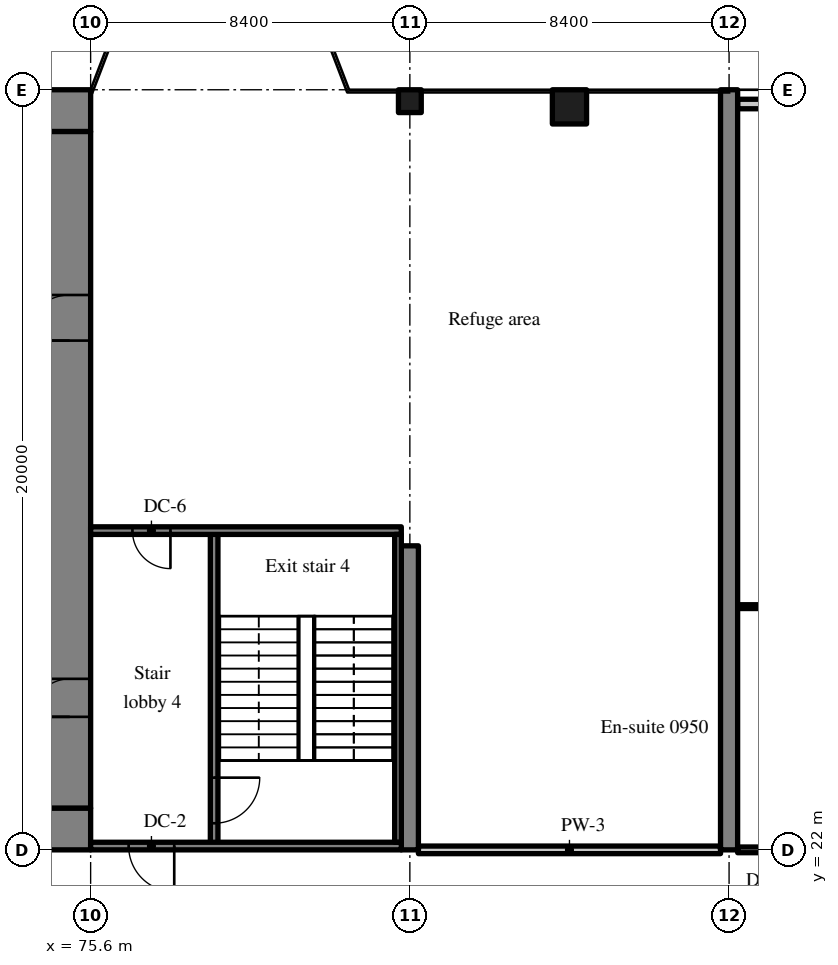
"""IFC4 building model, lengths in metres.
Left out: names, types, materials, properties, quantities, classifications, styles, units other than length and angle.
Written with IfcOpenShell. Run it as: python <this file> out.ifc"""

import sys

from ifc_helpers import new_model, si_unit, direction, frame, frame_2d, origin, origin_2d, place, context, subcontext, project, spatial, rectangle, extrude, source, transform, mapped, element, fill, save


model = new_model("IFC4")
c1 = context("Model", 3, precision=1e-05, world=origin(), true_north=direction((0.0, 1.0)))
c2 = subcontext(c1, "Body", "Model", "MODEL_VIEW")
j1 = project(units=[si_unit("LENGTHUNIT", "METRE"), si_unit("PLANEANGLEUNIT", "RADIAN")], contexts=[c1])
p1 = place(None, origin())
s1 = spatial("IfcSite", under=j1, at=p1, CompositionType="ELEMENT")
p2 = place(p1, origin())
s2 = spatial("IfcBuilding", under=s1, at=p2, CompositionType="ELEMENT")
p3 = place(p2, frame((0.0, 0.0, 43.0)))
s3 = spatial("IfcBuildingStorey", under=s2, at=p3, CompositionType="ELEMENT", Elevation=43.0)
m1 = source(origin(), c2, "Body", "SweptSolid", [
    extrude(rectangle(XDim=50.4, YDim=1.1, at=frame_2d((25.2, 0.0))), origin(), (0.0, 0.0, 1.0), 3.52),
])
p4 = place(p3, frame((25.2, 22.55, 0.0), z_axis=(0.0, 0.0, 1.0), x_axis=(1.0, 0.0, 0.0)))
e1 = element("IfcWall", 1, at=p4, inside=s3, PredefinedType="SHEAR", context=c2, shape_type="MappedRepresentation", body=[
    mapped(m1, transform((0.0, 0.0, 0.0), scale=1.0)),
])
m2 = source(origin(), c2, "Body", "SweptSolid", [
    extrude(rectangle(XDim=1.8, YDim=2.1, at=frame_2d((0.9, 1.05))), frame((0.0, 0.56, 0.0), z_axis=(0.0, -1.0, 0.0), x_axis=(1.0, 0.0, 0.0)), (0.0, 0.0, 1.0), 1.12),
])
p5 = place(p4, frame((15.9, 0.0, 0.0)))
e2 = element("IfcOpeningElement", 2, at=p5, cuts=e1, PredefinedType="OPENING", context=c2, shape_type="MappedRepresentation", body=[
    mapped(m2, transform((0.0, 0.0, 0.0), scale=1.0)),
])
m3 = source(origin(), c2, "Body", "SweptSolid", [
    extrude(rectangle(XDim=1.2, YDim=2.1, at=frame_2d((0.6, 1.05))), frame((0.0, 0.56, 0.0), z_axis=(0.0, -1.0, 0.0), x_axis=(1.0, 0.0, 0.0)), (0.0, 0.0, 1.0), 1.12),
])
p6 = place(p4, frame((27.0, 0.0, 0.0)))
e3 = element("IfcOpeningElement", 3, at=p6, cuts=e1, PredefinedType="OPENING", context=c2, shape_type="MappedRepresentation", body=[
    mapped(m3, transform((0.0, 0.0, 0.0), scale=1.0)),
])
m4 = source(origin(), c2, "Body", "SweptSolid", [
    extrude(rectangle(XDim=0.9, YDim=2.1, at=frame_2d((0.45, 1.05))), frame((0.0, 0.56, 0.0), z_axis=(0.0, -1.0, 0.0), x_axis=(1.0, 0.0, 0.0)), (0.0, 0.0, 1.0), 1.12),
])
p7 = place(p4, frame((33.75, 0.0, 0.0)))
e4 = element("IfcOpeningElement", 4, at=p7, cuts=e1, PredefinedType="OPENING", context=c2, shape_type="MappedRepresentation", body=[
    mapped(m4, transform((0.0, 0.0, 0.0), scale=1.0)),
])
p8 = place(p4, frame((30.75, 0.0, 0.0)))
e5 = element("IfcOpeningElement", 5, at=p8, cuts=e1, PredefinedType="OPENING", context=c2, shape_type="MappedRepresentation", body=[
    mapped(m4, transform((0.0, 0.0, 0.0), scale=1.0)),
])
p9 = place(p4, frame((39.75, 0.0, 0.0)))
e6 = element("IfcOpeningElement", 6, at=p9, cuts=e1, PredefinedType="OPENING", context=c2, shape_type="MappedRepresentation", body=[
    mapped(m4, transform((0.0, 0.0, 0.0), scale=1.0)),
])
p10 = place(p4, frame((36.75, 0.0, 0.0)))
e7 = element("IfcOpeningElement", 7, at=p10, cuts=e1, PredefinedType="OPENING", context=c2, shape_type="MappedRepresentation", body=[
    mapped(m4, transform((0.0, 0.0, 0.0), scale=1.0)),
])
p11 = place(p4, frame((6.425, 0.0, 0.0)))
e8 = element("IfcOpeningElement", 8, at=p11, cuts=e1, PredefinedType="OPENING", context=c2, shape_type="MappedRepresentation", body=[
    mapped(m3, transform((0.0, 0.0, 0.0), scale=1.0)),
])
p12 = place(p4, frame((47.675, 0.0, 0.0)))
e9 = element("IfcOpeningElement", 9, at=p12, cuts=e1, PredefinedType="OPENING", context=c2, shape_type="MappedRepresentation", body=[
    mapped(m3, transform((0.0, 0.0, 0.0), scale=1.0)),
])
p13 = place(p3, frame((25.2, 41.45, 0.0), z_axis=(0.0, 0.0, 1.0), x_axis=(1.0, 0.0, 0.0)))
e10 = element("IfcWall", 10, at=p13, inside=s3, PredefinedType="SHEAR", context=c2, shape_type="MappedRepresentation", body=[
    mapped(m1, transform((0.0, 0.0, 0.0), scale=1.0)),
])
m5 = source(origin(), c2, "Body", "SweptSolid", [
    extrude(rectangle(XDim=17.8, YDim=1.1, at=frame_2d((8.9, 0.0))), origin(), (0.0, 0.0, 1.0), 3.52),
])
p14 = place(p3, frame((75.05, 23.1, 0.0), z_axis=(0.0, 0.0, 1.0), x_axis=(0.0, 1.0, 0.0)))
e11 = element("IfcWall", 11, at=p14, inside=s3, PredefinedType="SHEAR", context=c2, shape_type="MappedRepresentation", body=[
    mapped(m5, transform((0.0, 0.0, 0.0), scale=1.0)),
])
m6 = source(origin(), c2, "Body", "SweptSolid", [
    extrude(rectangle(XDim=1.0, YDim=2.1, at=frame_2d((0.5, 1.05))), frame((0.0, 0.56, 0.0), z_axis=(0.0, -1.0, 0.0), x_axis=(1.0, 0.0, 0.0)), (0.0, 0.0, 1.0), 1.12),
])
p15 = place(p14, frame((2.4, 0.0, 0.0)))
e12 = element("IfcOpeningElement", 12, at=p15, cuts=e11, PredefinedType="OPENING", context=c2, shape_type="MappedRepresentation", body=[
    mapped(m6, transform((0.0, 0.0, 0.0), scale=1.0)),
])
p16 = place(p14, frame((12.3, 0.0, 0.0)))
e13 = element("IfcOpeningElement", 13, at=p16, cuts=e11, PredefinedType="OPENING", context=c2, shape_type="MappedRepresentation", body=[
    mapped(m3, transform((0.0, 0.0, 0.0), scale=1.0)),
])
m7 = source(origin(), c2, "Body", "SweptSolid", [
    extrude(rectangle(XDim=8.0, YDim=0.45, at=frame_2d((4.0, 0.0))), origin(), (0.0, 0.0, 1.0), 3.52),
])
p17 = place(p3, frame((84.0, 22.0, 0.0), z_axis=(0.0, 0.0, 1.0), x_axis=(0.0, 1.0, 0.0)))
e14 = element("IfcWall", 14, at=p17, inside=s3, PredefinedType="SHEAR", context=c2, shape_type="MappedRepresentation", body=[
    mapped(m7, transform((0.0, 0.0, 0.0), scale=1.0)),
])
m8 = source(origin(), c2, "Body", "SweptSolid", [
    extrude(rectangle(XDim=20.0, YDim=0.45, at=frame_2d((10.0, 0.0))), origin(), (0.0, 0.0, 1.0), 3.52),
])
p18 = place(p3, frame((92.4, 22.0, 0.0), z_axis=(0.0, 0.0, 1.0), x_axis=(0.0, 1.0, 0.0)))
e15 = element("IfcWall", 15, at=p18, inside=s3, PredefinedType="SHEAR", context=c2, shape_type="MappedRepresentation", body=[
    mapped(m8, transform((0.0, 0.0, 0.0), scale=1.0)),
])
m9 = source(origin(), c2, "Body", "SweptSolid", [
    extrude(rectangle(XDim=0.6, YDim=0.6, at=origin_2d()), origin(), (0.0, 0.0, 1.0), 3.52),
])
p19 = place(p3, frame((84.0, 41.7, 0.0), z_axis=(0.0, 0.0, 1.0), x_axis=(1.0, 0.0, 0.0)))
e16 = element("IfcColumn", 16, at=p19, inside=s3, PredefinedType="COLUMN", context=c2, shape_type="MappedRepresentation", body=[
    mapped(m9, transform((0.0, 0.0, 0.0), scale=1.0)),
])
m10 = source(origin(), c2, "Body", "SweptSolid", [
    extrude(rectangle(XDim=0.9, YDim=0.9, at=origin_2d()), origin(), (0.0, 0.0, 1.0), 3.52),
])
p20 = place(p3, frame((88.2, 41.55, 0.0), z_axis=(0.0, 0.0, 1.0), x_axis=(1.0, 0.0, 0.0)))
e17 = element("IfcColumn", 17, at=p20, inside=s3, PredefinedType="COLUMN", context=c2, shape_type="MappedRepresentation", body=[
    mapped(m10, transform((0.0, 0.0, 0.0), scale=1.0)),
])
m11 = source(origin(), c2, "Body", "SweptSolid", [
    extrude(rectangle(XDim=4.02, YDim=0.25, at=frame_2d((2.01, 0.0))), origin(), (0.0, 0.0, 1.0), 2.82),
])
p21 = place(p3, frame((96.645, 41.625, 0.0), z_axis=(0.0, 0.0, 1.0), x_axis=(-1.0, 0.0, 0.0)))
e18 = element("IfcWall", 18, at=p21, inside=s3, PredefinedType="SOLIDWALL", context=c2, shape_type="MappedRepresentation", body=[
    mapped(m11, transform((0.0, 0.0, 0.0), scale=1.0)),
])
m12 = source(origin(), c2, "Body", "SweptSolid", [
    extrude(rectangle(XDim=1.5, YDim=1.5, at=frame_2d((0.75, 0.75))), frame((0.0, 0.135, 0.0), z_axis=(0.0, -1.0, 0.0), x_axis=(1.0, 0.0, 0.0)), (0.0, 0.0, 1.0), 0.27),
])
p22 = place(p21, frame((1.26, 0.0, 0.9)))
e19 = element("IfcOpeningElement", 19, at=p22, cuts=e18, PredefinedType="OPENING", context=c2, shape_type="MappedRepresentation", body=[
    mapped(m12, transform((0.0, 0.0, 0.0), scale=1.0)),
])
m13 = source(origin(), c2, "Body", "SweptSolid", [
    extrude(rectangle(XDim=8.3, YDim=0.2, at=frame_2d((4.15, 0.0))), origin(), (0.0, 0.0, 1.0), 3.52),
])
p23 = place(p3, frame((78.85, 22.1, 0.0), z_axis=(0.0, 0.0, 1.0), x_axis=(0.0, 1.0, 0.0)))
e20 = element("IfcWall", 20, at=p23, inside=s3, PredefinedType="SOLIDWALL", context=c2, shape_type="MappedRepresentation", body=[
    mapped(m13, transform((0.0, 0.0, 0.0), scale=1.0)),
])
m14 = source(origin(), c2, "Body", "SweptSolid", [
    extrude(rectangle(XDim=1.2, YDim=2.1, at=frame_2d((0.6, 1.05))), frame((0.0, 0.11, 0.0), z_axis=(0.0, -1.0, 0.0), x_axis=(1.0, 0.0, 0.0)), (0.0, 0.0, 1.0), 0.22),
])
p24 = place(p23, frame((0.6, 0.0, 0.0)))
e21 = element("IfcOpeningElement", 21, at=p24, cuts=e20, PredefinedType="OPENING", context=c2, shape_type="MappedRepresentation", body=[
    mapped(m14, transform((0.0, 0.0, 0.0), scale=1.0)),
])
m15 = source(origin(), c2, "Body", "SweptSolid", [
    extrude(rectangle(XDim=8.175, YDim=0.2, at=frame_2d((4.087, 0.0))), origin(), (0.0, 0.0, 1.0), 3.52),
])
p25 = place(p3, frame((83.775, 22.1, 0.0), z_axis=(0.0, 0.0, 1.0), x_axis=(-1.0, 0.0, 0.0)))
e22 = element("IfcWall", 22, at=p25, inside=s3, PredefinedType="SOLIDWALL", context=c2, shape_type="MappedRepresentation", body=[
    mapped(m15, transform((0.0, 0.0, 0.0), scale=1.0)),
])
p26 = place(p25, frame((5.975, 0.0, 0.0)))
e23 = element("IfcOpeningElement", 23, at=p26, cuts=e22, PredefinedType="OPENING", context=c2, shape_type="MappedRepresentation", body=[
    mapped(m14, transform((0.0, 0.0, 0.0), scale=1.0)),
])
p27 = place(p3, frame((83.775, 30.4, 0.0), z_axis=(0.0, 0.0, 1.0), x_axis=(-1.0, 0.0, 0.0)))
e24 = element("IfcWall", 24, at=p27, inside=s3, PredefinedType="SOLIDWALL", context=c2, shape_type="MappedRepresentation", body=[
    mapped(m15, transform((0.0, 0.0, 0.0), scale=1.0)),
])
m16 = source(origin(), c2, "Body", "SweptSolid", [
    extrude(rectangle(XDim=1.0, YDim=2.1, at=frame_2d((0.5, 1.05))), frame((0.0, 0.11, 0.0), z_axis=(0.0, -1.0, 0.0), x_axis=(1.0, 0.0, 0.0)), (0.0, 0.0, 1.0), 0.22),
])
p28 = place(p27, frame((6.075, 0.0, 0.0)))
e25 = element("IfcOpeningElement", 25, at=p28, cuts=e24, PredefinedType="OPENING", context=c2, shape_type="MappedRepresentation", body=[
    mapped(m16, transform((0.0, 0.0, 0.0), scale=1.0)),
])
m17 = source(origin(), c2, "Body", "SweptSolid", [
    extrude(rectangle(XDim=8.1, YDim=0.175, at=frame_2d((4.05, 0.0))), origin(), (0.0, 0.0, 1.0), 3.52),
])
p29 = place(p3, frame((83.688, 22.2, 0.0), z_axis=(0.0, 0.0, 1.0), x_axis=(0.0, 1.0, 0.0)))
e26 = element("IfcWall", 26, at=p29, inside=s3, PredefinedType="SOLIDWALL", context=c2, shape_type="MappedRepresentation", body=[
    mapped(m17, transform((0.0, 0.0, 0.0), scale=1.0)),
])
m18 = source(origin(), c2, "Body", "SweptSolid", [
    extrude(rectangle(XDim=2.05, YDim=0.1, at=frame_2d((1.025, 0.0))), origin(), (0.0, 0.0, 1.0), 3.52),
])
p30 = place(p3, frame((92.625, 28.4, 0.0), z_axis=(0.0, 0.0, 1.0), x_axis=(1.0, 0.0, 0.0)))
e27 = element("IfcWall", 27, at=p30, inside=s3, PredefinedType="PARTITIONING", context=c2, shape_type="MappedRepresentation", body=[
    mapped(m18, transform((0.0, 0.0, 0.0), scale=1.0)),
])
m19 = source(origin(), c2, "Body", "SweptSolid", [
    extrude(rectangle(XDim=0.9, YDim=2.1, at=frame_2d((0.45, 1.05))), frame((0.0, 0.06, 0.0), z_axis=(0.0, -1.0, 0.0), x_axis=(1.0, 0.0, 0.0)), (0.0, 0.0, 1.0), 0.12),
])
p31 = place(p30, frame((0.575, 0.0, 0.0)))
e28 = element("IfcOpeningElement", 28, at=p31, cuts=e27, PredefinedType="OPENING", context=c2, shape_type="MappedRepresentation", body=[
    mapped(m19, transform((0.0, 0.0, 0.0), scale=1.0)),
])
m20 = source(origin(), c2, "Body", "SweptSolid", [
    extrude(rectangle(XDim=3.9, YDim=0.15, at=frame_2d((1.95, 0.0))), origin(), (0.0, 0.0, 1.0), 2.82),
])
p32 = place(p3, frame((92.625, 22.0, 0.0), z_axis=(0.0, 0.0, 1.0), x_axis=(1.0, 0.0, 0.0)))
e29 = element("IfcWall", 29, at=p32, inside=s3, PredefinedType="PARTITIONING", context=c2, shape_type="MappedRepresentation", body=[
    mapped(m20, transform((0.0, 0.0, 0.0), scale=1.0)),
])
m21 = source(origin(), c2, "Body", "SweptSolid", [
    extrude(rectangle(XDim=1.0, YDim=2.1, at=frame_2d((0.5, 1.05))), frame((0.0, 0.085, 0.0), z_axis=(0.0, -1.0, 0.0), x_axis=(1.0, 0.0, 0.0)), (0.0, 0.0, 1.0), 0.17),
])
p33 = place(p32, frame((2.5, 0.0, 0.0)))
e30 = element("IfcOpeningElement", 30, at=p33, cuts=e29, PredefinedType="OPENING", context=c2, shape_type="MappedRepresentation", body=[
    mapped(m21, transform((0.0, 0.0, 0.0), scale=1.0)),
])
m22 = source(origin(), c2, "Body", "SweptSolid", [
    extrude(rectangle(XDim=7.95, YDim=0.2, at=frame_2d((3.975, 0.0))), origin(), (0.0, 0.0, 1.0), 2.82),
])
p34 = place(p3, frame((84.225, 22.0, 0.0), z_axis=(0.0, 0.0, 1.0), x_axis=(1.0, 0.0, 0.0)))
e31 = element("IfcWall", 31, at=p34, inside=s3, PredefinedType="PARTITIONING", context=c2, shape_type="MappedRepresentation", body=[
    mapped(m22, transform((0.0, 0.0, 0.0), scale=1.0)),
])
m23 = source(origin(), c2, "Body", "SweptSolid", [
    extrude(rectangle(XDim=1.0, YDim=2.1, at=frame_2d((0.5, 1.05))), frame((0.0, 0.025, 0.0), z_axis=(0.0, -1.0, 0.0), x_axis=(1.0, 0.0, 0.0)), (0.0, 0.0, 1.0), 0.05),
])
p35 = place(p15, origin())
e32 = element("IfcDoor", 32, at=p35, inside=s3, OperationType="SINGLE_SWING_LEFT", PredefinedType="DOOR", context=c2, shape_type="MappedRepresentation", body=[
    mapped(m23, transform((0.0, 0.0, 0.0), scale=1.0)),
])
fill(e12, e32)
m24 = source(origin(), c2, "Body", "SweptSolid", [
    extrude(rectangle(XDim=1.2, YDim=2.1, at=frame_2d((0.6, 1.05))), frame((0.0, 0.025, 0.0), z_axis=(0.0, -1.0, 0.0), x_axis=(1.0, 0.0, 0.0)), (0.0, 0.0, 1.0), 0.05),
])
p36 = place(p16, origin())
e33 = element("IfcDoor", 33, at=p36, inside=s3, OperationType="SINGLE_SWING_LEFT", PredefinedType="DOOR", context=c2, shape_type="MappedRepresentation", body=[
    mapped(m24, transform((0.0, 0.0, 0.0), scale=1.0)),
])
fill(e13, e33)
p37 = place(p24, origin())
e34 = element("IfcDoor", 34, at=p37, inside=s3, OperationType="SINGLE_SWING_RIGHT", PredefinedType="DOOR", context=c2, shape_type="MappedRepresentation", body=[
    mapped(m24, transform((0.0, 0.0, 0.0), scale=1.0)),
])
fill(e21, e34)
p38 = place(p26, origin())
e35 = element("IfcDoor", 35, at=p38, inside=s3, OperationType="SINGLE_SWING_LEFT", PredefinedType="DOOR", context=c2, shape_type="MappedRepresentation", body=[
    mapped(m24, transform((0.0, 0.0, 0.0), scale=1.0)),
])
fill(e23, e35)
p39 = place(p28, origin())
e36 = element("IfcDoor", 36, at=p39, inside=s3, OperationType="SINGLE_SWING_LEFT", PredefinedType="DOOR", context=c2, shape_type="MappedRepresentation", body=[
    mapped(m23, transform((0.0, 0.0, 0.0), scale=1.0)),
])
fill(e25, e36)
save(model, sys.argv[1])
